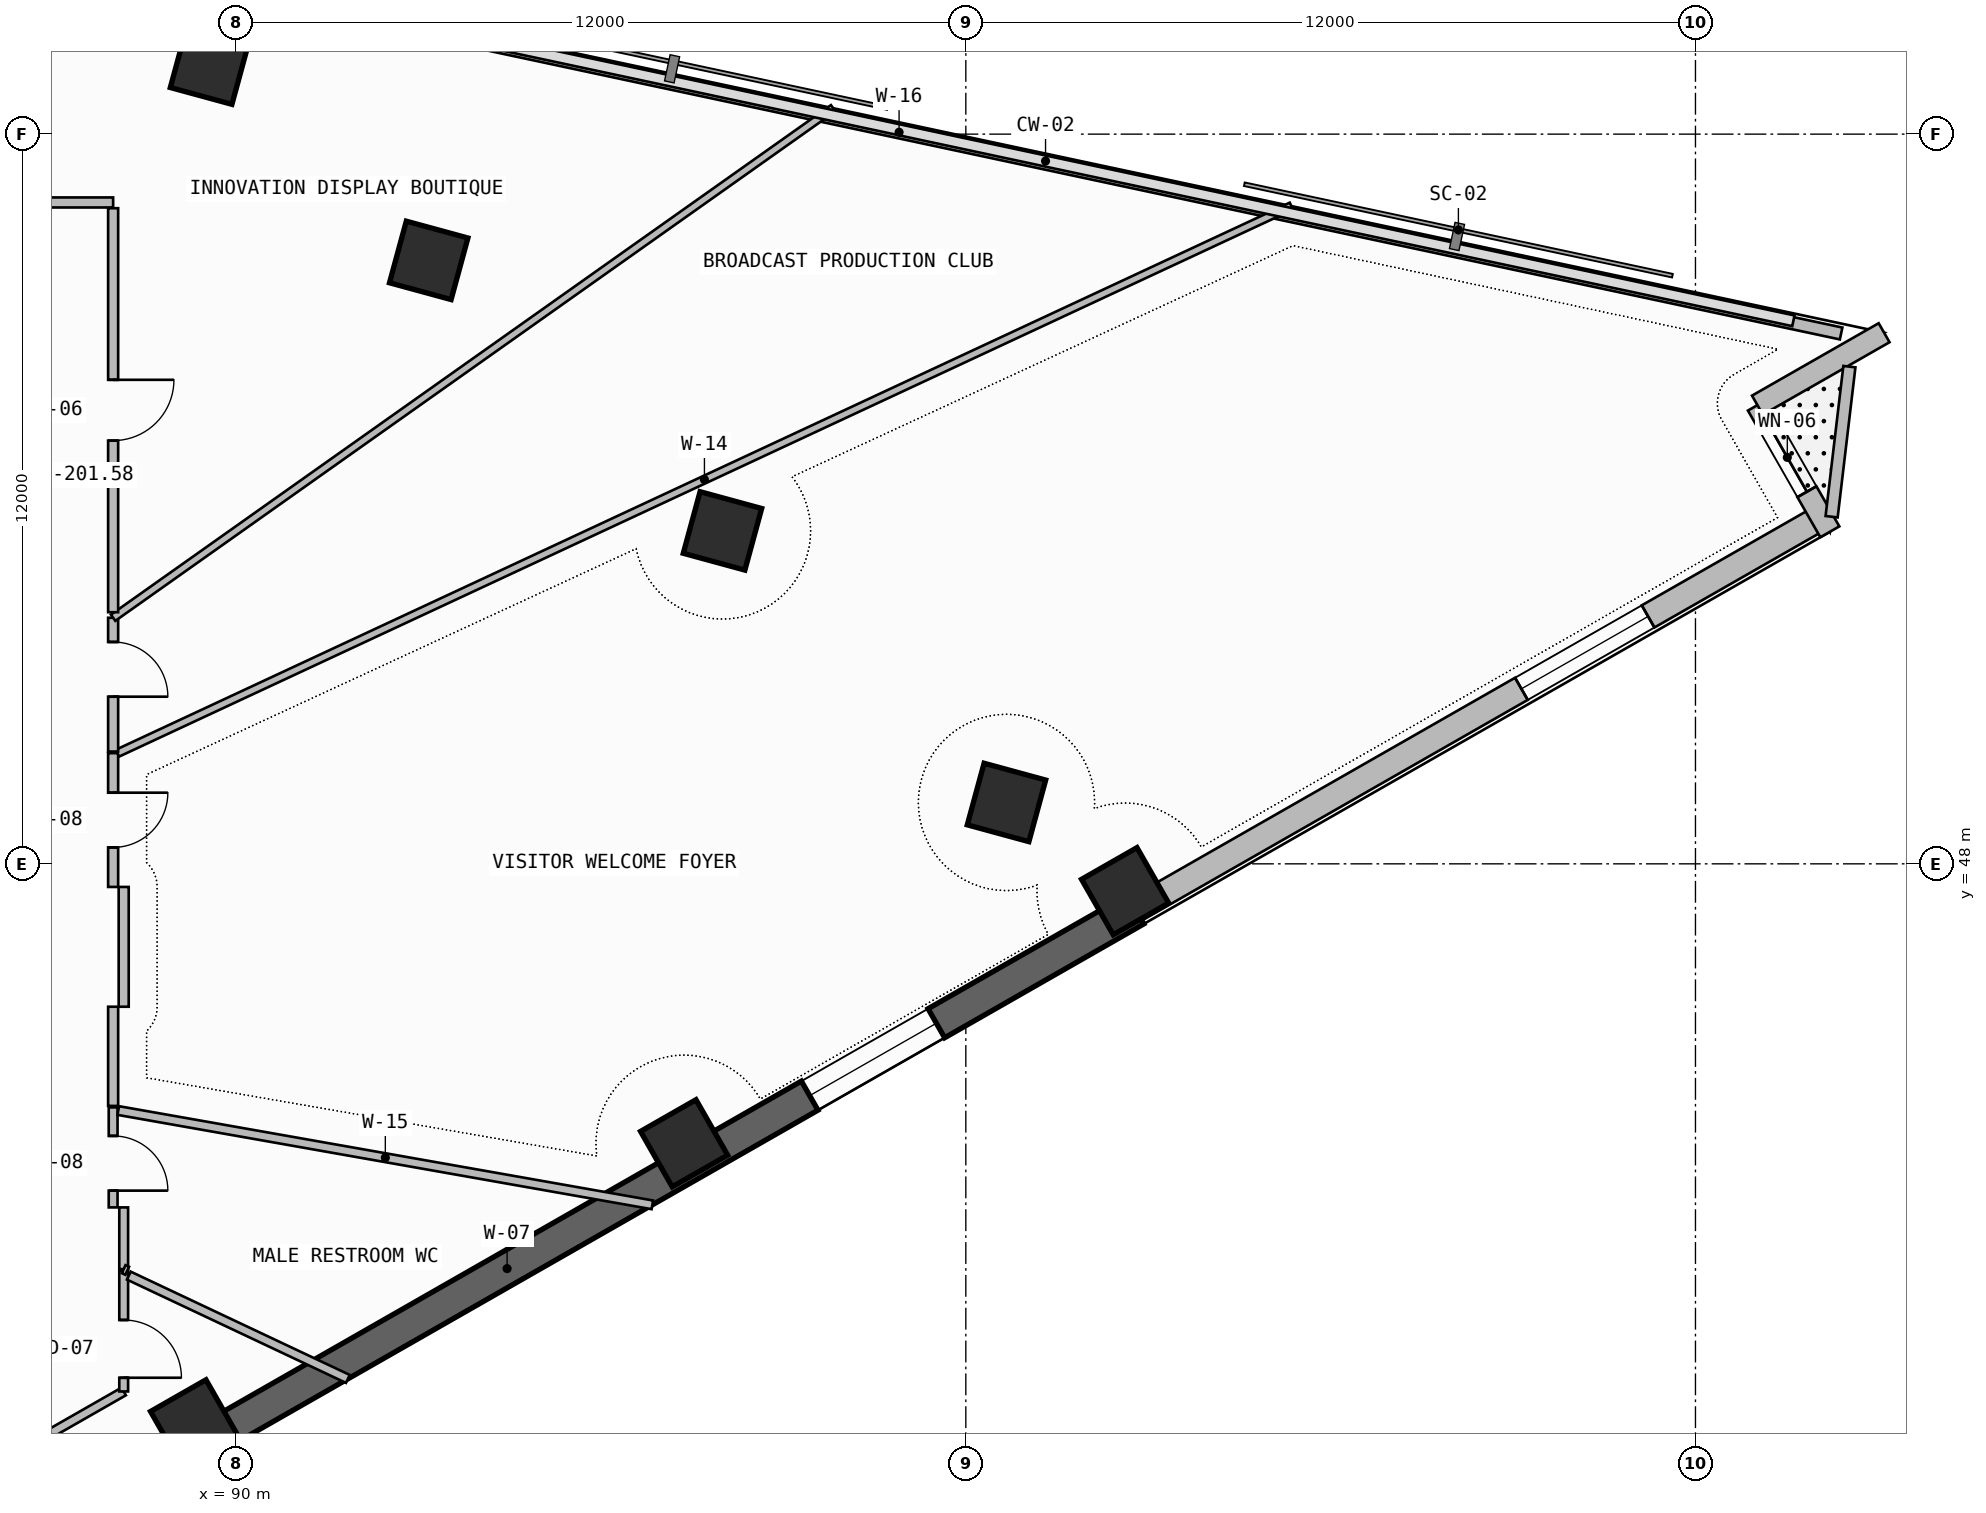
"""IFC4 building model, lengths in metres.
Left out: names, types, materials, properties, quantities, classifications, styles, units other than length and angle.
Written with IfcOpenShell. Run it as: python <this file> out.ifc"""

import sys

from ifc_helpers import new_model, si_unit, direction, frame, frame_2d, origin, origin_2d, place, context, subcontext, project, spatial, rectangle, extrude, element, fill, save


model = new_model("IFC4")
c1 = context("Model", 3, precision=1e-05, world=origin(), true_north=direction((0.0, 1.0)))
c2 = subcontext(c1, "Body", "Model", "MODEL_VIEW")
j1 = project(units=[si_unit("LENGTHUNIT", "METRE"), si_unit("PLANEANGLEUNIT", "RADIAN")], contexts=[c1])
p1 = place(None, origin())
s1 = spatial("IfcSite", under=j1, at=p1, CompositionType="ELEMENT")
p2 = place(p1, origin())
s2 = spatial("IfcBuilding", under=s1, at=p2, CompositionType="ELEMENT")
p3 = place(p2, frame((0.0, 0.0, 207.94)))
s3 = spatial("IfcBuildingStorey", under=s2, at=p3, CompositionType="ELEMENT", Elevation=207.94)
for number, where, z_axis, x_axis in (
    (1, (89.308, 38.799, 0.0), (0.0, 0.0, 1.0), (0.868, 0.496, 0.0)),
    (2, (97.367, 43.405, 0.0), (0.0, 0.0, 1.0), (0.868, 0.496, 0.0)),
    (3, (104.62, 47.55, 0.0), (0.0, 0.0, 1.0), (0.868, 0.496, 0.0)),
    (4, (102.669, 49.01, 0.0), (0.0, 0.0, 1.0), (0.263, 0.965, 0.0)),
    (5, (97.998, 53.475, 0.0), (0.0, 0.0, 1.0), (0.263, 0.965, 0.0)),
    (6, (93.167, 57.924, 0.0), (0.0, 0.0, 1.0), (0.263, 0.965, 0.0)),
    (7, (89.562, 61.135, 0.0), (0.0, 0.0, 1.0), (0.263, 0.965, 0.0)),
):
    element("IfcColumn", number, at=place(p3, frame(where, z_axis=z_axis, x_axis=x_axis)), inside=s3, PredefinedType="COLUMN", context=c2, shape_type="SweptSolid", body=[
        extrude(rectangle(XDim=1.05, YDim=1.05, at=origin_2d()), origin(), (0.0, 0.0, 1.0), 3.52),
    ])
p4 = place(p3, frame((86.1, 36.568, 0.0), z_axis=(0.0, 0.0, 1.0), x_axis=(0.868192956745, 0.496226752461, 0.0)))
e8 = element("IfcWall", 8, at=p4, inside=s3, PredefinedType="SOLIDWALL", context=c2, shape_type="SweptSolid", body=[
    extrude(rectangle(XDim=3.892, YDim=0.42, at=frame_2d((1.946, 0.0))), origin(), (0.0, 0.0, 1.0), 2.245),
])
p5 = place(p3, frame((89.479, 38.499, -0.26), z_axis=(0.0, 0.0, 1.0), x_axis=(0.868197136736, 0.496219439123, 0.0)))
e9 = element("IfcWall", 9, at=p5, inside=s3, PredefinedType="SHEAR", context=c2, shape_type="SweptSolid", body=[
    extrude(rectangle(XDim=17.636, YDim=0.55, at=frame_2d((8.818, 0.0))), origin(), (0.0, 0.0, 1.0), 3.52),
])
p6 = place(p5, frame((11.464, 0.0, 1.1)))
e10 = element("IfcOpeningElement", 10, at=p6, cuts=e9, PredefinedType="OPENING", context=c2, shape_type="SweptSolid", body=[
    extrude(rectangle(XDim=2.4, YDim=1.2, at=frame_2d((1.2, 0.6))), frame((0.0, 0.285, 0.0), z_axis=(0.0, -1.0, 0.0), x_axis=(1.0, 0.0, 0.0)), (0.0, 0.0, 1.0), 0.57),
])
p7 = place(p3, frame((104.791, 47.25, 0.0), z_axis=(0.0, 0.0, 1.0), x_axis=(0.868193423982, 0.496225934987, 0.0)))
e11 = element("IfcWall", 11, at=p7, inside=s3, PredefinedType="SOLIDWALL", context=c2, shape_type="SweptSolid", body=[
    extrude(rectangle(XDim=12.995, YDim=0.42, at=frame_2d((6.498, 0.0))), origin(), (0.0, 0.0, 1.0), 2.245),
])
p8 = place(p7, frame((7.31, 0.0, 0.965)))
e12 = element("IfcOpeningElement", 12, at=p8, cuts=e11, PredefinedType="OPENING", context=c2, shape_type="SweptSolid", body=[
    extrude(rectangle(XDim=2.4, YDim=1.2, at=frame_2d((1.2, 0.6))), frame((0.0, 0.22, 0.0), z_axis=(0.0, -1.0, 0.0), x_axis=(1.0, 0.0, 0.0)), (0.0, 0.0, 1.0), 0.44),
])
p9 = place(p3, frame((116.21, 53.46, 0.0), z_axis=(0.0, 0.0, 1.0), x_axis=(-0.496215637313, 0.868199309655, 0.0)))
e13 = element("IfcWall", 13, at=p9, inside=s3, PredefinedType="SOLIDWALL", context=c2, shape_type="SweptSolid", body=[
    extrude(rectangle(XDim=2.399, YDim=0.36, at=frame_2d((1.2, 0.0))), origin(), (0.0, 0.0, 1.0), 3.26),
])
p10 = place(p9, frame((0.76, 0.0, 0.45)))
e14 = element("IfcOpeningElement", 14, at=p10, cuts=e13, PredefinedType="OPENING", context=c2, shape_type="SweptSolid", body=[
    extrude(rectangle(XDim=1.3, YDim=2.4, at=frame_2d((0.65, 1.2))), frame((0.0, 0.19, 0.0), z_axis=(0.0, -1.0, 0.0), x_axis=(1.0, 0.0, 0.0)), (0.0, 0.0, 1.0), 0.38),
])
p11 = place(p3, frame((115.019, 55.543, 0.0), z_axis=(0.0, 0.0, 1.0), x_axis=(0.86818053093, 0.4962484919, 0.0)))
e15 = element("IfcWall", 15, at=p11, inside=s3, PredefinedType="SOLIDWALL", context=c2, shape_type="SweptSolid", body=[
    extrude(rectangle(XDim=2.4, YDim=0.36, at=frame_2d((1.2, 0.0))), origin(), (0.0, 0.0, 1.0), 3.26),
])
p12 = place(p3, frame((116.239, 53.708, 0.0), z_axis=(0.0, 0.0, 1.0), x_axis=(0.117587871261, 0.993062481686, 0.0)))
e16 = element("IfcWall", 16, at=p12, inside=s3, PredefinedType="PARAPET", context=c2, shape_type="SweptSolid", body=[
    extrude(rectangle(XDim=2.485, YDim=0.2, at=frame_2d((1.243, 0.0))), origin(), (0.0, 0.0, 1.0), 1.15),
])
p13 = place(p3, frame((116.396, 56.722, 0.0), z_axis=(0.0, 0.0, 1.0), x_axis=(-0.977936620644, 0.208901809478, 0.0)))
e17 = element("IfcWall", 17, at=p13, inside=s3, PredefinedType="PARAPET", context=c2, shape_type="SweptSolid", body=[
    extrude(rectangle(XDim=31.685, YDim=0.2, at=frame_2d((15.843, 0.0))), origin(), (0.0, 0.0, 1.0), 1.15),
])
p14 = place(p3, frame((86.3, 38.266, 0.0), z_axis=(0.0, 0.0, 1.0), x_axis=(0.868179674817, 0.496249989657, 0.0)))
e18 = element("IfcWall", 18, at=p14, inside=s3, PredefinedType="PARTITIONING", context=c2, shape_type="SweptSolid", body=[
    extrude(rectangle(XDim=2.131, YDim=0.145, at=frame_2d((1.065, 0.0))), origin(), (0.0, 0.0, 1.0), 3.26),
])
p15 = place(p3, frame((88.15, 39.323, 0.0), z_axis=(0.0, 0.0, 1.0), x_axis=(0.0, 1.0, 0.0)))
e19 = element("IfcWall", 19, at=p15, inside=s3, PredefinedType="PARTITIONING", context=c2, shape_type="SweptSolid", body=[
    extrude(rectangle(XDim=1.985, YDim=0.145, at=frame_2d((0.992, 0.0))), origin(), (0.0, 0.0, 1.0), 2.745),
])
p16 = place(p15, frame((0.225, 0.0, 0.0)))
e20 = element("IfcOpeningElement", 20, at=p16, cuts=e19, PredefinedType="OPENING", context=c2, shape_type="SweptSolid", body=[
    extrude(rectangle(XDim=0.95, YDim=2.15, at=frame_2d((0.475, 1.075))), frame((0.0, 0.083, 0.0), z_axis=(0.0, -1.0, 0.0), x_axis=(1.0, 0.0, 0.0)), (0.0, 0.0, 1.0), 0.165),
])
p17 = place(p3, frame((88.235, 41.228, 0.0), z_axis=(0.0, 0.0, 1.0), x_axis=(0.904454353527, -0.426570419023, 0.0)))
e21 = element("IfcWall", 21, at=p17, inside=s3, PredefinedType="PARTITIONING", context=c2, shape_type="SweptSolid", body=[
    extrude(rectangle(XDim=3.982, YDim=0.145, at=frame_2d((1.991, 0.0))), origin(), (0.0, 0.0, 1.0), 2.245),
])
p18 = place(p3, frame((87.976, 42.35, 0.0), z_axis=(0.0, 0.0, 1.0), x_axis=(0.0, 1.0, 0.0)))
e22 = element("IfcWall", 22, at=p18, inside=s3, PredefinedType="PARTITIONING", context=c2, shape_type="SweptSolid", body=[
    extrude(rectangle(XDim=1.644, YDim=0.145, at=frame_2d((0.822, 0.0))), origin(), (0.0, 0.0, 1.0), 2.745),
])
p19 = place(p18, frame((0.276, 0.0, 0.0)))
e23 = element("IfcOpeningElement", 23, at=p19, cuts=e22, PredefinedType="OPENING", context=c2, shape_type="SweptSolid", body=[
    extrude(rectangle(XDim=0.9, YDim=2.1, at=frame_2d((0.45, 1.05))), frame((0.0, 0.083, 0.0), z_axis=(0.0, -1.0, 0.0), x_axis=(1.0, 0.0, 0.0)), (0.0, 0.0, 1.0), 0.165),
])
p20 = place(p3, frame((88.15, 41.334, 0.0), z_axis=(0.0, 0.0, 1.0), x_axis=(0.0, 1.0, 0.0)))
e24 = element("IfcWall", 24, at=p20, inside=s3, PredefinedType="PARTITIONING", context=c2, shape_type="SweptSolid", body=[
    extrude(rectangle(XDim=1.016, YDim=0.145, at=frame_2d((0.508, 0.0))), origin(), (0.0, 0.0, 1.0), 2.845),
])
p21 = place(p3, frame((88.208, 41.308, 0.0), z_axis=(0.0, 0.0, 1.0), x_axis=(-0.909307898958, 0.41612395376, 0.0)))
e25 = element("IfcWall", 25, at=p21, inside=s3, PredefinedType="PARTITIONING", context=c2, shape_type="SweptSolid", body=[
    extrude(rectangle(XDim=0.063, YDim=0.145, at=frame_2d((0.032, 0.0))), origin(), (0.0, 0.0, 1.0), 3.26),
])
p22 = place(p3, frame((88.061, 43.943, 0.0), z_axis=(0.0, 0.0, 1.0), x_axis=(0.98476674656, -0.173880576456, 0.0)))
e26 = element("IfcWall", 26, at=p22, inside=s3, PredefinedType="PARTITIONING", context=c2, shape_type="SweptSolid", body=[
    extrude(rectangle(XDim=8.92, YDim=0.145, at=frame_2d((4.46, 0.0))), origin(), (0.0, 0.0, 1.0), 2.245),
])
p23 = place(p3, frame((87.976, 47.62, 0.0), z_axis=(0.0, 0.0, 1.0), x_axis=(0.0, 1.0, 0.0)))
e27 = element("IfcWall", 27, at=p23, inside=s3, PredefinedType="PARTITIONING", context=c2, shape_type="SweptSolid", body=[
    extrude(rectangle(XDim=2.2, YDim=0.165, at=frame_2d((1.1, 0.0))), origin(), (0.0, 0.0, 1.0), 3.26),
])
p24 = place(p23, frame((0.65, 0.0, 0.0)))
e28 = element("IfcOpeningElement", 28, at=p24, cuts=e27, PredefinedType="OPENING", context=c2, shape_type="SweptSolid", body=[
    extrude(rectangle(XDim=0.9, YDim=2.1, at=frame_2d((0.45, 1.05))), frame((0.0, 0.093, 0.0), z_axis=(0.0, -1.0, 0.0), x_axis=(1.0, 0.0, 0.0)), (0.0, 0.0, 1.0), 0.185),
])
p25 = place(p3, frame((88.15, 45.65, 0.0), z_axis=(0.0, 0.0, 1.0), x_axis=(0.0, 1.0, 0.0)))
e29 = element("IfcWall", 29, at=p25, inside=s3, PredefinedType="PARTITIONING", context=c2, shape_type="SweptSolid", body=[
    extrude(rectangle(XDim=1.97, YDim=0.165, at=frame_2d((0.985, 0.0))), origin(), (0.0, 0.0, 1.0), 3.26),
])
p26 = place(p3, frame((87.976, 44.019, 0.0), z_axis=(0.0, 0.0, 1.0), x_axis=(0.0, 1.0, 0.0)))
e30 = element("IfcWall", 30, at=p26, inside=s3, PredefinedType="PARTITIONING", context=c2, shape_type="SweptSolid", body=[
    extrude(rectangle(XDim=1.631, YDim=0.165, at=frame_2d((0.815, 0.0))), origin(), (0.0, 0.0, 1.0), 2.745),
])
p27 = place(p3, frame((88.048, 49.82, 0.0), z_axis=(0.0, 0.0, 1.0), x_axis=(0.906409961827, 0.422399078006, 0.0)))
e31 = element("IfcWall", 31, at=p27, inside=s3, PredefinedType="PARTITIONING", context=c2, shape_type="SweptSolid", body=[
    extrude(rectangle(XDim=21.299, YDim=0.125, at=frame_2d((10.649, 0.0))), origin(), (0.0, 0.0, 1.0), 2.645),
])
p28 = place(p3, frame((87.976, 49.846, 0.0), z_axis=(0.0, 0.0, 1.0), x_axis=(0.0, 1.0, 0.0)))
e32 = element("IfcWall", 32, at=p28, inside=s3, PredefinedType="PARTITIONING", context=c2, shape_type="SweptSolid", body=[
    extrude(rectangle(XDim=2.2, YDim=0.165, at=frame_2d((1.1, 0.0))), origin(), (0.0, 0.0, 1.0), 3.26),
])
p29 = place(p28, frame((0.902, 0.0, 0.0)))
e33 = element("IfcOpeningElement", 33, at=p29, cuts=e32, PredefinedType="OPENING", context=c2, shape_type="SweptSolid", body=[
    extrude(rectangle(XDim=0.9, YDim=2.1, at=frame_2d((0.45, 1.05))), frame((0.0, 0.093, 0.0), z_axis=(0.0, -1.0, 0.0), x_axis=(1.0, 0.0, 0.0)), (0.0, 0.0, 1.0), 0.185),
])
p30 = place(p3, frame((87.976, 52.047, 0.0), z_axis=(0.0, 0.0, 1.0), x_axis=(0.81628635006, 0.577647465765, 0.0)))
e34 = element("IfcWall", 34, at=p30, inside=s3, PredefinedType="PARTITIONING", context=c2, shape_type="SweptSolid", body=[
    extrude(rectangle(XDim=14.507, YDim=0.125, at=frame_2d((7.253, 0.0))), origin(), (0.0, 0.0, 1.0), 2.645),
])
p31 = place(p3, frame((87.976, 58.876, 0.0), z_axis=(0.0, 0.0, 1.0), x_axis=(-1.0, 0.0, 0.0)))
e35 = element("IfcWall", 35, at=p31, inside=s3, PredefinedType="PARTITIONING", context=c2, shape_type="SweptSolid", body=[
    extrude(rectangle(XDim=6.859, YDim=0.165, at=frame_2d((3.43, 0.0))), origin(), (0.0, 0.0, 1.0), 2.745),
])
p32 = place(p3, frame((87.976, 52.138, 0.0), z_axis=(0.0, 0.0, 1.0), x_axis=(0.0, 1.0, 0.0)))
e36 = element("IfcWall", 36, at=p32, inside=s3, PredefinedType="PARTITIONING", context=c2, shape_type="SweptSolid", body=[
    extrude(rectangle(XDim=6.644, YDim=0.165, at=frame_2d((3.322, 0.0))), origin(), (0.0, 0.0, 1.0), 2.745),
])
p33 = place(p32, frame((2.822, 0.0, 0.0)))
e37 = element("IfcOpeningElement", 37, at=p33, cuts=e36, PredefinedType="OPENING", context=c2, shape_type="SweptSolid", body=[
    extrude(rectangle(XDim=1.0, YDim=2.2, at=frame_2d((0.5, 1.1))), frame((0.0, 0.093, 0.0), z_axis=(0.0, -1.0, 0.0), x_axis=(1.0, 0.0, 0.0)), (0.0, 0.0, 1.0), 0.185),
])
p34 = place(p6, origin())
e38 = element("IfcWindow", 38, at=p34, inside=s3, PartitioningType="SINGLE_PANEL", PredefinedType="WINDOW", context=c2, shape_type="SweptSolid", body=[
    extrude(rectangle(XDim=2.4, YDim=1.2, at=frame_2d((1.2, 0.6))), frame((0.0, 0.03, 0.0), z_axis=(0.0, -1.0, 0.0), x_axis=(1.0, 0.0, 0.0)), (0.0, 0.0, 1.0), 0.06),
])
fill(e10, e38)
p35 = place(p8, origin())
e39 = element("IfcWindow", 39, at=p35, inside=s3, PartitioningType="SINGLE_PANEL", PredefinedType="WINDOW", context=c2, shape_type="SweptSolid", body=[
    extrude(rectangle(XDim=2.4, YDim=1.2, at=frame_2d((1.2, 0.6))), frame((0.0, 0.03, 0.0), z_axis=(0.0, -1.0, 0.0), x_axis=(1.0, 0.0, 0.0)), (0.0, 0.0, 1.0), 0.06),
])
fill(e12, e39)
p36 = place(p10, origin())
e40 = element("IfcWindow", 40, at=p36, inside=s3, PartitioningType="SINGLE_PANEL", PredefinedType="WINDOW", context=c2, shape_type="SweptSolid", body=[
    extrude(rectangle(XDim=1.3, YDim=2.4, at=frame_2d((0.65, 1.2))), frame((0.0, 0.03, 0.0), z_axis=(0.0, -1.0, 0.0), x_axis=(1.0, 0.0, 0.0)), (0.0, 0.0, 1.0), 0.06),
])
fill(e14, e40)
p37 = place(p16, frame((0.95, 0.0, 0.0), z_axis=(0.0, 0.0, 1.0), x_axis=(-1.0, 0.0, 0.0)))
e41 = element("IfcDoor", 41, at=p37, inside=s3, OperationType="SINGLE_SWING_RIGHT", PredefinedType="DOOR", context=c2, shape_type="SweptSolid", body=[
    extrude(rectangle(XDim=0.95, YDim=2.15, at=frame_2d((0.475, 1.075))), frame((0.0, 0.025, 0.0), z_axis=(0.0, -1.0, 0.0), x_axis=(1.0, 0.0, 0.0)), (0.0, 0.0, 1.0), 0.05),
])
fill(e20, e41)
p38 = place(p19, frame((0.9, 0.0, 0.0), z_axis=(0.0, 0.0, 1.0), x_axis=(-1.0, 0.0, 0.0)))
e42 = element("IfcDoor", 42, at=p38, inside=s3, OperationType="SINGLE_SWING_RIGHT", PredefinedType="DOOR", context=c2, shape_type="SweptSolid", body=[
    extrude(rectangle(XDim=0.9, YDim=2.1, at=frame_2d((0.45, 1.05))), frame((0.0, 0.025, 0.0), z_axis=(0.0, -1.0, 0.0), x_axis=(1.0, 0.0, 0.0)), (0.0, 0.0, 1.0), 0.05),
])
fill(e23, e42)
p39 = place(p24, frame((0.9, 0.0, 0.0), z_axis=(0.0, 0.0, 1.0), x_axis=(-1.0, 0.0, 0.0)))
e43 = element("IfcDoor", 43, at=p39, inside=s3, OperationType="SINGLE_SWING_LEFT", PredefinedType="DOOR", context=c2, shape_type="SweptSolid", body=[
    extrude(rectangle(XDim=0.9, YDim=2.1, at=frame_2d((0.45, 1.05))), frame((0.0, 0.025, 0.0), z_axis=(0.0, -1.0, 0.0), x_axis=(1.0, 0.0, 0.0)), (0.0, 0.0, 1.0), 0.05),
])
fill(e28, e43)
p40 = place(p29, frame((0.9, 0.0, 0.0), z_axis=(0.0, 0.0, 1.0), x_axis=(-1.0, 0.0, 0.0)))
e44 = element("IfcDoor", 44, at=p40, inside=s3, OperationType="SINGLE_SWING_RIGHT", PredefinedType="DOOR", context=c2, shape_type="SweptSolid", body=[
    extrude(rectangle(XDim=0.9, YDim=2.1, at=frame_2d((0.45, 1.05))), frame((0.0, 0.025, 0.0), z_axis=(0.0, -1.0, 0.0), x_axis=(1.0, 0.0, 0.0)), (0.0, 0.0, 1.0), 0.05),
])
fill(e33, e44)
p41 = place(p33, frame((1.0, 0.0, 0.0), z_axis=(0.0, 0.0, 1.0), x_axis=(-1.0, 0.0, 0.0)))
e45 = element("IfcDoor", 45, at=p41, inside=s3, OperationType="SINGLE_SWING_LEFT", PredefinedType="DOOR", context=c2, shape_type="SweptSolid", body=[
    extrude(rectangle(XDim=1.0, YDim=2.2, at=frame_2d((0.5, 1.1))), frame((0.0, 0.025, 0.0), z_axis=(0.0, -1.0, 0.0), x_axis=(1.0, 0.0, 0.0)), (0.0, 0.0, 1.0), 0.05),
])
fill(e37, e45)
save(model, sys.argv[1])
